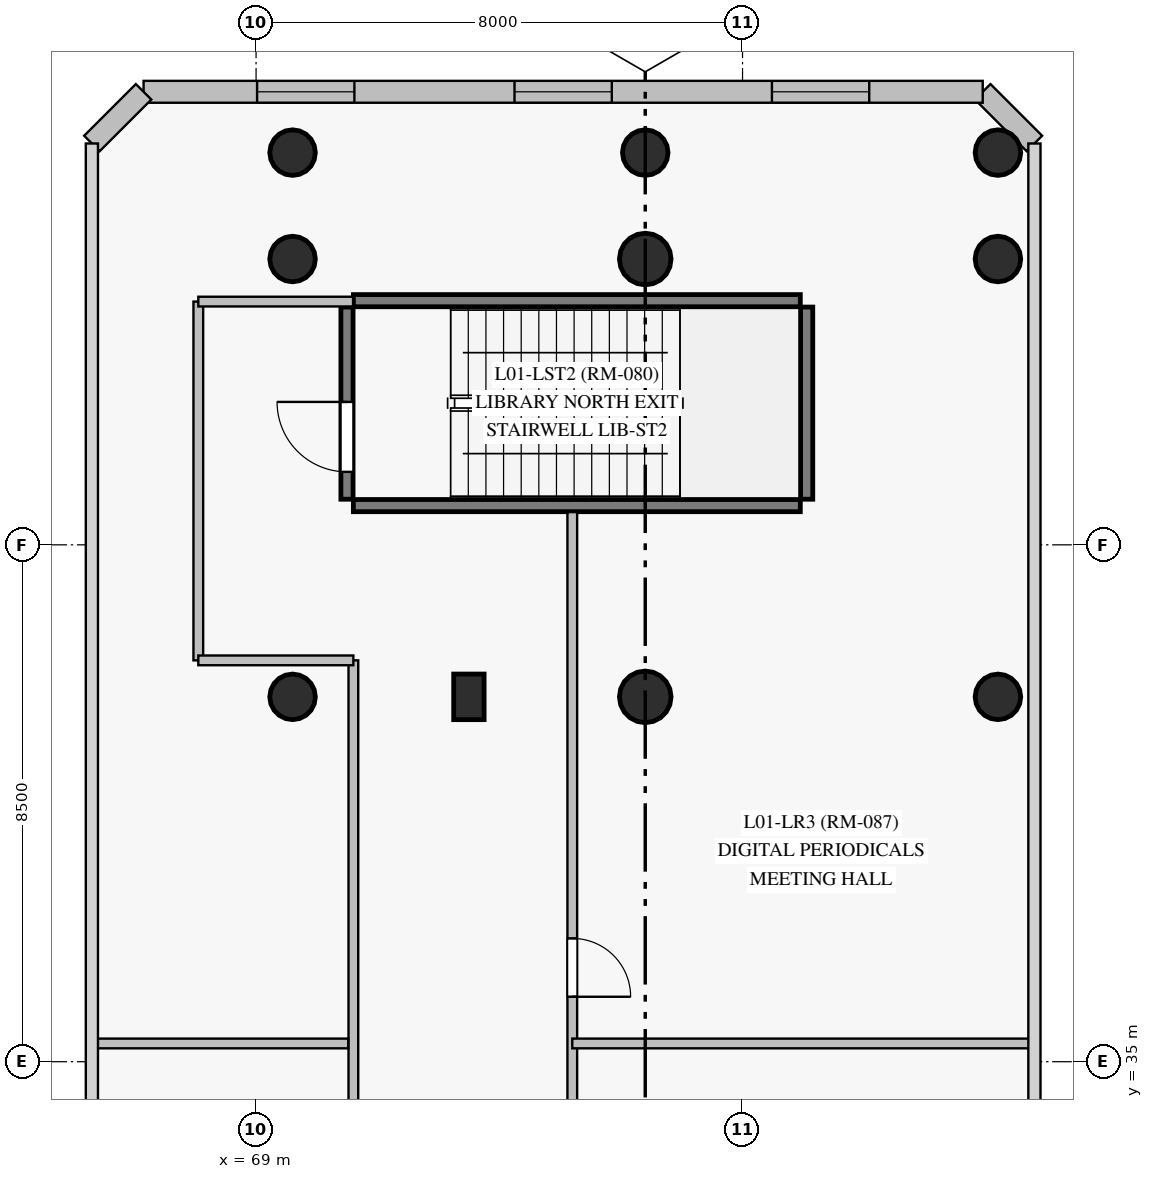
"""IFC4 building model, lengths in metres.
Left out: names, types, materials, properties, quantities, classifications, styles, units other than length and angle.
Written with IfcOpenShell. Run it as: python <this file> out.ifc"""

import sys

from ifc_helpers import new_model, si_unit, direction, frame, frame_2d, origin, origin_with_axes, origin_2d, place, context, subcontext, project, spatial, rectangle, circle, extrude, source, transform, mapped, element, fill, save


model = new_model("IFC4")
c1 = context("Model", 3, precision=1e-05, world=origin(), true_north=direction((0.0, 1.0)))
c2 = subcontext(c1, "Body", "Model", "MODEL_VIEW")
j1 = project(units=[si_unit("LENGTHUNIT", "METRE"), si_unit("PLANEANGLEUNIT", "RADIAN")], contexts=[c1])
p1 = place(None, origin())
s1 = spatial("IfcSite", under=j1, at=p1, CompositionType="ELEMENT")
p2 = place(p1, origin())
s2 = spatial("IfcBuilding", under=s1, at=p2, CompositionType="ELEMENT")
p3 = place(p2, frame((0.0, 0.0, 4.5)))
s3 = spatial("IfcBuildingStorey", under=s2, at=p3, CompositionType="ELEMENT", Elevation=4.5)
m1 = source(origin_with_axes(), c2, "Body", "SweptSolid", [
    extrude(circle(Radius=0.375, at=origin_2d()), origin(), (0.0, 0.0, 1.0), 4.5),
])
for number, where, z_axis, x_axis in (
    (1, (69.6, 49.95, 0.0), (0.0, 0.0, 1.0), (1.0, 0.0, 0.0)),
    (2, (75.4, 49.95, 0.0), (0.0, 0.0, 1.0), (1.0, 0.0, 0.0)),
    (3, (81.2, 49.95, 0.0), (0.0, 0.0, 1.0), (1.0, 0.0, 0.0)),
    (4, (69.6, 41.0, 0.0), (0.0, 0.0, 1.0), (1.0, 0.0, 0.0)),
    (5, (69.6, 48.2, 0.0), (0.0, 0.0, 1.0), (1.0, 0.0, 0.0)),
):
    element("IfcColumn", number, at=place(p3, frame(where, z_axis=z_axis, x_axis=x_axis)), inside=s3, PredefinedType="COLUMN", context=c2, shape_type="MappedRepresentation", body=[
        mapped(m1, transform((0.0, 0.0, 0.0), scale=1.0)),
    ])
m2 = source(origin_with_axes(), c2, "Body", "SweptSolid", [
    extrude(circle(Radius=0.425, at=origin_2d()), origin(), (0.0, 0.0, 1.0), 4.5),
])
for number, where, z_axis, x_axis in (
    (6, (75.4, 41.0, 0.0), (0.0, 0.0, 1.0), (1.0, 0.0, 0.0)),
    (7, (75.4, 48.2, 0.0), (0.0, 0.0, 1.0), (1.0, 0.0, 0.0)),
):
    element("IfcColumn", number, at=place(p3, frame(where, z_axis=z_axis, x_axis=x_axis)), inside=s3, PredefinedType="COLUMN", context=c2, shape_type="MappedRepresentation", body=[
        mapped(m2, transform((0.0, 0.0, 0.0), scale=1.0)),
    ])
for number, where, z_axis, x_axis in (
    (8, (81.2, 41.0, 0.0), (0.0, 0.0, 1.0), (1.0, 0.0, 0.0)),
    (9, (81.2, 48.2, 0.0), (0.0, 0.0, 1.0), (1.0, 0.0, 0.0)),
):
    element("IfcColumn", number, at=place(p3, frame(where, z_axis=z_axis, x_axis=x_axis)), inside=s3, PredefinedType="COLUMN", context=c2, shape_type="MappedRepresentation", body=[
        mapped(m1, transform((0.0, 0.0, 0.0), scale=1.0)),
    ])
m3 = source(origin_with_axes(), c2, "Body", "SweptSolid", [
    extrude(rectangle(XDim=0.5, YDim=0.75, at=origin_2d()), origin(), (0.0, 0.0, 1.0), 4.5),
])
p4 = place(p3, frame((72.5, 41.0, 0.0), z_axis=(0.0, 0.0, 1.0), x_axis=(1.0, 0.0, 0.0)))
e10 = element("IfcColumn", 10, at=p4, inside=s3, PredefinedType="PILASTER", context=c2, shape_type="MappedRepresentation", body=[
    mapped(m3, transform((0.0, 0.0, 0.0), scale=1.0)),
])
p5 = place(p3, frame((81.8, 50.1, 0.0), z_axis=(0.0, 0.0, 1.0), x_axis=(-0.707208325923, 0.707005221866, 0.0)))
e11 = element("IfcWall", 11, at=p5, inside=s3, PredefinedType="SOLIDWALL", context=c2, shape_type="SweptSolid", body=[
    extrude(rectangle(XDim=1.202, YDim=0.36, at=frame_2d((0.601, 0.0))), origin(), (0.0, 0.0, 1.0), 4.2),
])
p6 = place(p3, frame((80.95, 50.95, 0.0), z_axis=(0.0, 0.0, 1.0), x_axis=(-1.0, 0.0, 0.0)))
e12 = element("IfcWall", 12, at=p6, inside=s3, PredefinedType="SOLIDWALL", context=c2, shape_type="SweptSolid", body=[
    extrude(rectangle(XDim=13.8, YDim=0.36, at=frame_2d((6.9, 0.0))), origin(), (0.0, 0.0, 1.0), 4.2),
])
p7 = place(p6, frame((1.867, 0.0, 0.85)))
e13 = element("IfcOpeningElement", 13, at=p7, cuts=e12, PredefinedType="OPENING", context=c2, shape_type="SweptSolid", body=[
    extrude(rectangle(XDim=1.6, YDim=2.2, at=frame_2d((0.8, 1.1))), frame((0.0, 0.19, 0.0), z_axis=(0.0, -1.0, 0.0), x_axis=(1.0, 0.0, 0.0)), (0.0, 0.0, 1.0), 0.38),
])
p8 = place(p6, frame((6.1, 0.0, 0.85)))
e14 = element("IfcOpeningElement", 14, at=p8, cuts=e12, PredefinedType="OPENING", context=c2, shape_type="SweptSolid", body=[
    extrude(rectangle(XDim=1.6, YDim=2.2, at=frame_2d((0.8, 1.1))), frame((0.0, 0.19, 0.0), z_axis=(0.0, -1.0, 0.0), x_axis=(1.0, 0.0, 0.0)), (0.0, 0.0, 1.0), 0.38),
])
p9 = place(p6, frame((10.333, 0.0, 0.85)))
e15 = element("IfcOpeningElement", 15, at=p9, cuts=e12, PredefinedType="OPENING", context=c2, shape_type="SweptSolid", body=[
    extrude(rectangle(XDim=1.6, YDim=2.2, at=frame_2d((0.8, 1.1))), frame((0.0, 0.19, 0.0), z_axis=(0.0, -1.0, 0.0), x_axis=(1.0, 0.0, 0.0)), (0.0, 0.0, 1.0), 0.38),
])
p10 = place(p3, frame((67.15, 50.95, 0.0), z_axis=(0.0, 0.0, 1.0), x_axis=(-0.707106781187, -0.707106781187, 0.0)))
e16 = element("IfcWall", 16, at=p10, inside=s3, PredefinedType="SOLIDWALL", context=c2, shape_type="SweptSolid", body=[
    extrude(rectangle(XDim=1.202, YDim=0.36, at=frame_2d((0.601, 0.0))), origin(), (0.0, 0.0, 1.0), 4.2),
])
for number, where, z_axis, x_axis in (
    (17, (70.6, 44.145, 0.0), (0.0, 0.0, 1.0), (1.0, 0.0, 0.0)),
    (18, (70.6, 47.515, 0.0), (0.0, 0.0, 1.0), (1.0, 0.0, 0.0)),
):
    element("IfcWall", number, at=place(p3, frame(where, z_axis=z_axis, x_axis=x_axis)), inside=s3, PredefinedType="SHEAR", context=c2, shape_type="SweptSolid", body=[
        extrude(rectangle(XDim=7.35, YDim=0.2, at=frame_2d((3.675, 0.0))), origin(), (0.0, 0.0, 1.0), 4.2),
    ])
p11 = place(p3, frame((70.495, 44.25, 0.0), z_axis=(0.0, 0.0, 1.0), x_axis=(0.0, 1.0, 0.0)))
e19 = element("IfcWall", 19, at=p11, inside=s3, PredefinedType="SHEAR", context=c2, shape_type="SweptSolid", body=[
    extrude(rectangle(XDim=3.16, YDim=0.2, at=frame_2d((1.58, 0.0))), origin(), (0.0, 0.0, 1.0), 4.2),
])
p12 = place(p11, frame((0.45, 0.0, 0.0)))
e20 = element("IfcOpeningElement", 20, at=p12, cuts=e19, PredefinedType="OPENING", context=c2, shape_type="SweptSolid", body=[
    extrude(rectangle(XDim=1.15, YDim=2.15, at=frame_2d((0.575, 1.075))), frame((0.0, 0.11, 0.0), z_axis=(0.0, -1.0, 0.0), x_axis=(1.0, 0.0, 0.0)), (0.0, 0.0, 1.0), 0.22),
])
p13 = place(p3, frame((78.055, 44.25, 0.0), z_axis=(0.0, 0.0, 1.0), x_axis=(0.0, 1.0, 0.0)))
e21 = element("IfcWall", 21, at=p13, inside=s3, PredefinedType="SHEAR", context=c2, shape_type="SweptSolid", body=[
    extrude(rectangle(XDim=3.16, YDim=0.2, at=frame_2d((1.58, 0.0))), origin(), (0.0, 0.0, 1.0), 4.2),
])
p14 = place(p3, frame((70.6, 11.4, 0.0), z_axis=(0.0, 0.0, 1.0), x_axis=(0.0, 1.0, 0.0)))
e22 = element("IfcWall", 22, at=p14, inside=s3, PredefinedType="PARTITIONING", context=c2, shape_type="SweptSolid", body=[
    extrude(rectangle(XDim=30.2, YDim=0.16, at=frame_2d((15.1, 0.0))), origin(), (0.0, 0.0, 1.0), 4.2),
])
p15 = place(p3, frame((74.2, 44.038, 0.0), z_axis=(0.0, 0.0, 1.0), x_axis=(0.0, -1.0, 0.0)))
e23 = element("IfcWall", 23, at=p15, inside=s3, PredefinedType="PARTITIONING", context=c2, shape_type="SweptSolid", body=[
    extrude(rectangle(XDim=15.138, YDim=0.16, at=frame_2d((7.569, 0.0))), origin(), (0.0, 0.0, 1.0), 4.2),
])
p16 = place(p15, frame((10.996, 0.0, 0.0)))
e24 = element("IfcOpeningElement", 24, at=p16, cuts=e23, PredefinedType="OPENING", context=c2, shape_type="SweptSolid", body=[
    extrude(rectangle(XDim=0.96, YDim=2.15, at=frame_2d((0.48, 1.075))), frame((0.0, 0.09, 0.0), z_axis=(0.0, -1.0, 0.0), x_axis=(1.0, 0.0, 0.0)), (0.0, 0.0, 1.0), 0.18),
])
p17 = place(p15, frame((7.01, 0.0, 0.0)))
e25 = element("IfcOpeningElement", 25, at=p17, cuts=e23, PredefinedType="OPENING", context=c2, shape_type="SweptSolid", body=[
    extrude(rectangle(XDim=0.96, YDim=2.15, at=frame_2d((0.48, 1.075))), frame((0.0, 0.09, 0.0), z_axis=(0.0, -1.0, 0.0), x_axis=(1.0, 0.0, 0.0)), (0.0, 0.0, 1.0), 0.18),
])
p18 = place(p3, frame((74.2, 35.3, 0.0), z_axis=(0.0, 0.0, 1.0), x_axis=(1.0, 0.0, 0.0)))
e26 = element("IfcWall", 26, at=p18, inside=s3, PredefinedType="PARTITIONING", context=c2, shape_type="SweptSolid", body=[
    extrude(rectangle(XDim=7.545, YDim=0.16, at=frame_2d((3.772, 0.0))), origin(), (0.0, 0.0, 1.0), 4.2),
])
p19 = place(p3, frame((68.05, 41.6, 0.0), z_axis=(0.0, 0.0, 1.0), x_axis=(0.0, 1.0, 0.0)))
e27 = element("IfcWall", 27, at=p19, inside=s3, PredefinedType="PARTITIONING", context=c2, shape_type="SweptSolid", body=[
    extrude(rectangle(XDim=5.9, YDim=0.16, at=frame_2d((2.95, 0.0))), origin(), (0.0, 0.0, 1.0), 4.2),
])
p20 = place(p3, frame((66.355, 35.3, 0.0), z_axis=(0.0, 0.0, 1.0), x_axis=(1.0, 0.0, 0.0)))
e28 = element("IfcWall", 28, at=p20, inside=s3, PredefinedType="PARTITIONING", context=c2, shape_type="SweptSolid", body=[
    extrude(rectangle(XDim=4.16, YDim=0.16, at=frame_2d((2.08, 0.0))), origin(), (0.0, 0.0, 1.0), 4.2),
])
p21 = place(p3, frame((70.6, 41.6, 0.0), z_axis=(0.0, 0.0, 1.0), x_axis=(-1.0, 0.0, 0.0)))
e29 = element("IfcWall", 29, at=p21, inside=s3, PredefinedType="PARTITIONING", context=c2, shape_type="SweptSolid", body=[
    extrude(rectangle(XDim=2.55, YDim=0.16, at=frame_2d((1.275, 0.0))), origin(), (0.0, 0.0, 1.0), 3.55),
])
p22 = place(p3, frame((68.05, 47.5, 0.0), z_axis=(0.0, 0.0, 1.0), x_axis=(1.0, 0.0, 0.0)))
e30 = element("IfcWall", 30, at=p22, inside=s3, PredefinedType="PARTITIONING", context=c2, shape_type="SweptSolid", body=[
    extrude(rectangle(XDim=2.545, YDim=0.16, at=frame_2d((1.272, 0.0))), origin(), (0.0, 0.0, 1.0), 4.2),
])
m4 = source(origin_with_axes(), c2, "Body", "SweptSolid", [
    extrude(rectangle(XDim=1.6, YDim=2.2, at=frame_2d((0.8, 1.1))), frame((0.0, 0.03, 0.0), z_axis=(0.0, -1.0, 0.0), x_axis=(1.0, 0.0, 0.0)), (0.0, 0.0, 1.0), 0.06),
])
p23 = place(p7, origin())
e31 = element("IfcWindow", 31, at=p23, inside=s3, PartitioningType="SINGLE_PANEL", PredefinedType="WINDOW", context=c2, shape_type="MappedRepresentation", body=[
    mapped(m4, transform((0.0, 0.0, 0.0), scale=1.0)),
])
fill(e13, e31)
p24 = place(p8, origin())
e32 = element("IfcWindow", 32, at=p24, inside=s3, PartitioningType="SINGLE_PANEL", PredefinedType="WINDOW", context=c2, shape_type="MappedRepresentation", body=[
    mapped(m4, transform((0.0, 0.0, 0.0), scale=1.0)),
])
fill(e14, e32)
p25 = place(p9, origin())
e33 = element("IfcWindow", 33, at=p25, inside=s3, PartitioningType="SINGLE_PANEL", PredefinedType="WINDOW", context=c2, shape_type="MappedRepresentation", body=[
    mapped(m4, transform((0.0, 0.0, 0.0), scale=1.0)),
])
fill(e15, e33)
m5 = source(origin_with_axes(), c2, "Body", "SweptSolid", [
    extrude(rectangle(XDim=1.15, YDim=2.15, at=frame_2d((0.575, 1.075))), frame((0.0, 0.025, 0.0), z_axis=(0.0, -1.0, 0.0), x_axis=(1.0, 0.0, 0.0)), (0.0, 0.0, 1.0), 0.05),
])
p26 = place(p12, origin())
e34 = element("IfcDoor", 34, at=p26, inside=s3, OperationType="SINGLE_SWING_RIGHT", PredefinedType="DOOR", context=c2, shape_type="MappedRepresentation", body=[
    mapped(m5, transform((0.0, 0.0, 0.0), scale=1.0)),
])
fill(e20, e34)
m6 = source(origin_with_axes(), c2, "Body", "SweptSolid", [
    extrude(rectangle(XDim=0.96, YDim=2.15, at=frame_2d((0.48, 1.075))), frame((0.0, 0.025, 0.0), z_axis=(0.0, -1.0, 0.0), x_axis=(1.0, 0.0, 0.0)), (0.0, 0.0, 1.0), 0.05),
])
p27 = place(p17, origin())
e35 = element("IfcDoor", 35, at=p27, inside=s3, OperationType="SINGLE_SWING_RIGHT", PredefinedType="DOOR", context=c2, shape_type="MappedRepresentation", body=[
    mapped(m6, transform((0.0, 0.0, 0.0), scale=1.0)),
])
fill(e25, e35)
save(model, sys.argv[1])
